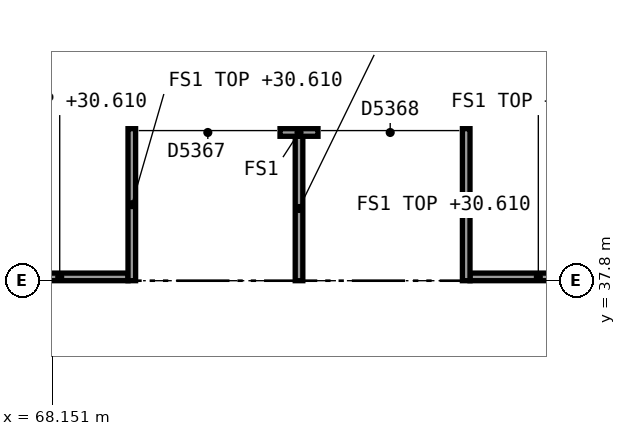
"""IFC4 building model, lengths in metres.
Left out: names, types, materials, properties, quantities, classifications, styles, units other than length and angle.
Written with IfcOpenShell. Run it as: python <this file> out.ifc"""

import sys

from ifc_helpers import new_model, si_unit, direction, frame, frame_2d, origin, place, context, subcontext, project, spatial, rectangle, extrude, element, fill, save


model = new_model("IFC4")
c1 = context("Model", 3, precision=1e-05, world=origin(), true_north=direction((0.0, 1.0)))
c2 = subcontext(c1, "Body", "Model", "MODEL_VIEW")
j1 = project(units=[si_unit("LENGTHUNIT", "METRE"), si_unit("PLANEANGLEUNIT", "RADIAN")], contexts=[c1])
p1 = place(None, origin())
s1 = spatial("IfcSite", under=j1, at=p1, CompositionType="ELEMENT")
p2 = place(p1, origin())
s2 = spatial("IfcBuilding", under=s1, at=p2, CompositionType="ELEMENT")
p3 = place(p2, frame((0.0, 0.0, 25.8)))
s3 = spatial("IfcBuildingStorey", under=s2, at=p3, CompositionType="ELEMENT", Elevation=25.8)
p4 = place(p3, frame((67.353, 37.85, 0.0), z_axis=(0.0, 0.0, 1.0), x_axis=(1.0, 0.0, 0.0)))
e1 = element("IfcWall", 1, at=p4, inside=s3, PredefinedType="PARTITIONING", context=c2, shape_type="SweptSolid", body=[
    extrude(rectangle(XDim=1.797, YDim=0.1, at=frame_2d((0.898, 0.0))), origin(), (0.0, 0.0, 1.0), 4.81),
])
p5 = place(p3, frame((73.65, 37.85, 0.0), z_axis=(0.0, 0.0, 1.0), x_axis=(1.0, 0.0, 0.0)))
e2 = element("IfcWall", 2, at=p5, inside=s3, PredefinedType="PARTITIONING", context=c2, shape_type="SweptSolid", body=[
    extrude(rectangle(XDim=1.798, YDim=0.1, at=frame_2d((0.899, 0.0))), origin(), (0.0, 0.0, 1.0), 4.81),
])
p6 = place(p3, frame((69.2, 37.8, 0.0), z_axis=(0.0, 0.0, 1.0), x_axis=(0.0, 1.0, 0.0)))
e3 = element("IfcWall", 3, at=p6, inside=s3, PredefinedType="PARTITIONING", context=c2, shape_type="SweptSolid", body=[
    extrude(rectangle(XDim=2.0, YDim=0.1, at=frame_2d((1.0, 0.0))), origin(), (0.0, 0.0, 1.0), 4.81),
])
p7 = place(p3, frame((71.4, 37.8, 0.0), z_axis=(0.0, 0.0, 1.0), x_axis=(0.0, 1.0, 0.0)))
e4 = element("IfcWall", 4, at=p7, inside=s3, PredefinedType="PARTITIONING", context=c2, shape_type="SweptSolid", body=[
    extrude(rectangle(XDim=1.9, YDim=0.1, at=frame_2d((0.95, 0.0))), origin(), (0.0, 0.0, 1.0), 4.81),
])
p8 = place(p3, frame((73.6, 37.8, 0.0), z_axis=(0.0, 0.0, 1.0), x_axis=(0.0, 1.0, 0.0)))
e5 = element("IfcWall", 5, at=p8, inside=s3, PredefinedType="PARTITIONING", context=c2, shape_type="SweptSolid", body=[
    extrude(rectangle(XDim=2.0, YDim=0.1, at=frame_2d((1.0, 0.0))), origin(), (0.0, 0.0, 1.0), 4.81),
])
p9 = place(p3, frame((69.25, 39.75, 0.0), z_axis=(0.0, 0.0, 1.0), x_axis=(1.0, 0.0, 0.0)))
e6 = element("IfcWall", 6, at=p9, inside=s3, PredefinedType="PARTITIONING", context=c2, shape_type="SweptSolid", body=[
    extrude(rectangle(XDim=4.3, YDim=0.1, at=frame_2d((2.15, 0.0))), origin(), (0.0, 0.0, 1.0), 5.2),
])
p10 = place(p9, origin())
e7 = element("IfcOpeningElement", 7, at=p10, cuts=e6, PredefinedType="OPENING", context=c2, shape_type="SweptSolid", body=[
    extrude(rectangle(XDim=1.91, YDim=2.4, at=frame_2d((0.945, 1.2))), frame((0.0, 0.06, 0.0), z_axis=(0.0, -1.0, 0.0), x_axis=(1.0, 0.0, 0.0)), (0.0, 0.0, 1.0), 0.12),
])
p11 = place(p9, frame((2.4, 0.0, 0.0)))
e8 = element("IfcOpeningElement", 8, at=p11, cuts=e6, PredefinedType="OPENING", context=c2, shape_type="SweptSolid", body=[
    extrude(rectangle(XDim=1.91, YDim=2.4, at=frame_2d((0.955, 1.2))), frame((0.0, 0.06, 0.0), z_axis=(0.0, -1.0, 0.0), x_axis=(1.0, 0.0, 0.0)), (0.0, 0.0, 1.0), 0.12),
])
p12 = place(p10, origin())
e9 = element("IfcDoor", 9, at=p12, inside=s3, OperationType="DOUBLE_DOOR_SLIDING", PredefinedType="DOOR", context=c2, shape_type="SweptSolid", body=[
    extrude(rectangle(XDim=1.9, YDim=2.4, at=frame_2d((0.95, 1.2))), frame((0.0, 0.025, 0.0), z_axis=(0.0, -1.0, 0.0), x_axis=(1.0, 0.0, 0.0)), (0.0, 0.0, 1.0), 0.05),
])
fill(e7, e9)
p13 = place(p11, origin())
e10 = element("IfcDoor", 10, at=p13, inside=s3, OperationType="DOUBLE_DOOR_SLIDING", PredefinedType="DOOR", context=c2, shape_type="SweptSolid", body=[
    extrude(rectangle(XDim=1.9, YDim=2.4, at=frame_2d((0.95, 1.2))), frame((0.0, 0.025, 0.0), z_axis=(0.0, -1.0, 0.0), x_axis=(1.0, 0.0, 0.0)), (0.0, 0.0, 1.0), 0.05),
])
fill(e8, e10)
save(model, sys.argv[1])
